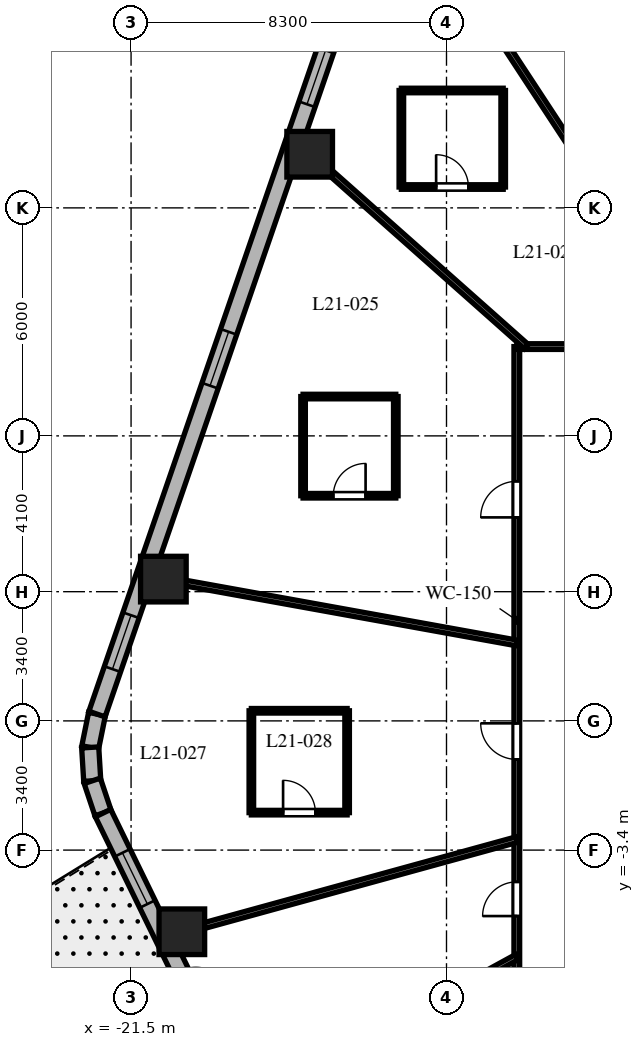
"""IFC4 building model, lengths in metres.
Left out: names, types, materials, properties, quantities, classifications, styles, units other than length and angle.
Written with IfcOpenShell. Run it as: python <this file> out.ifc"""

import sys

from ifc_helpers import new_model, si_unit, direction, frame, frame_2d, origin, origin_2d, place, context, subcontext, project, spatial, rectangle, extrude, element, fill, save


model = new_model("IFC4")
c1 = context("Model", 3, precision=1e-05, world=origin(), true_north=direction((0.0, 1.0)))
c2 = subcontext(c1, "Body", "Model", "MODEL_VIEW")
j1 = project(units=[si_unit("LENGTHUNIT", "METRE"), si_unit("PLANEANGLEUNIT", "RADIAN")], contexts=[c1])
p1 = place(None, origin())
s1 = spatial("IfcSite", under=j1, at=p1, CompositionType="ELEMENT")
p2 = place(p1, origin())
s2 = spatial("IfcBuilding", under=s1, at=p2, CompositionType="ELEMENT")
p3 = place(p2, frame((0.0, 0.0, 91.4)))
s3 = spatial("IfcBuildingStorey", under=s2, at=p3, CompositionType="ELEMENT", Elevation=91.4)
for number, where, z_axis, x_axis in (
    (1, (-16.8, 14.911, 0.0), (0.0, 0.0, 1.0), (1.0, 0.0, 0.0)),
    (2, (-20.65, 3.731, 0.0), (0.0, 0.0, 1.0), (1.0, 0.0, 0.0)),
    (3, (-20.164, -5.549, 0.0), (0.0, 0.0, 1.0), (1.0, 0.0, 0.0)),
):
    element("IfcColumn", number, at=place(p3, frame(where, z_axis=z_axis, x_axis=x_axis)), inside=s3, PredefinedType="COLUMN", context=c2, shape_type="SweptSolid", body=[
        extrude(rectangle(XDim=1.2, YDim=1.2, at=origin_2d()), origin(), (0.0, 0.0, 1.0), 3.7),
    ])
p4 = place(p3, frame((-22.397, 0.179, 0.0), z_axis=(0.0, 0.0, 1.0), x_axis=(-0.199313589404, -0.979935759669, 0.0)))
e4 = element("IfcWall", 4, at=p4, inside=s3, PredefinedType="SOLIDWALL", context=c2, shape_type="SweptSolid", body=[
    extrude(rectangle(XDim=0.896, YDim=0.45, at=frame_2d((0.448, 0.0))), origin(), (0.0, 0.0, 1.0), 3.4),
])
p5 = place(p3, frame((-22.575, -0.698, 0.0), z_axis=(0.0, 0.0, 1.0), x_axis=(0.060980441946, -0.998138961117, 0.0)))
e5 = element("IfcWall", 5, at=p5, inside=s3, PredefinedType="SOLIDWALL", context=c2, shape_type="SweptSolid", body=[
    extrude(rectangle(XDim=0.881, YDim=0.45, at=frame_2d((0.44, 0.0))), origin(), (0.0, 0.0, 1.0), 3.4),
])
p6 = place(p3, frame((-22.522, -1.577, 0.0), z_axis=(0.0, 0.0, 1.0), x_axis=(0.317372694837, -0.948300887151, 0.0)))
e6 = element("IfcWall", 6, at=p6, inside=s3, PredefinedType="SOLIDWALL", context=c2, shape_type="SweptSolid", body=[
    extrude(rectangle(XDim=0.896, YDim=0.45, at=frame_2d((0.448, 0.0))), origin(), (0.0, 0.0, 1.0), 3.4),
])
p7 = place(p3, frame((-15.992, 18.777, 0.0), z_axis=(0.0, 0.0, 1.0), x_axis=(-0.325606988926, -0.945505202927, 0.0)))
e7 = element("IfcWall", 7, at=p7, inside=s3, PredefinedType="SOLIDWALL", context=c2, shape_type="SweptSolid", body=[
    extrude(rectangle(XDim=19.669, YDim=0.45, at=frame_2d((9.835, 0.0))), origin(), (0.0, 0.0, 1.0), 3.4),
])
p8 = place(p7, frame((1.197, 0.0, 0.8)))
e8 = element("IfcOpeningElement", 8, at=p8, cuts=e7, PredefinedType="OPENING", context=c2, shape_type="SweptSolid", body=[
    extrude(rectangle(XDim=1.5, YDim=1.8, at=frame_2d((0.75, 0.9))), frame((0.0, 0.235, 0.0), z_axis=(0.0, -1.0, 0.0), x_axis=(1.0, 0.0, 0.0)), (0.0, 0.0, 1.0), 0.47),
])
p9 = place(p7, frame((9.03, 0.0, 0.8)))
e9 = element("IfcOpeningElement", 9, at=p9, cuts=e7, PredefinedType="OPENING", context=c2, shape_type="SweptSolid", body=[
    extrude(rectangle(XDim=1.5, YDim=1.8, at=frame_2d((0.75, 0.9))), frame((0.0, 0.235, 0.0), z_axis=(0.0, -1.0, 0.0), x_axis=(1.0, 0.0, 0.0)), (0.0, 0.0, 1.0), 0.47),
])
p10 = place(p7, frame((16.918, 0.0, 0.8)))
e10 = element("IfcOpeningElement", 10, at=p10, cuts=e7, PredefinedType="OPENING", context=c2, shape_type="SweptSolid", body=[
    extrude(rectangle(XDim=1.5, YDim=1.8, at=frame_2d((0.75, 0.9))), frame((0.0, 0.235, 0.0), z_axis=(0.0, -1.0, 0.0), x_axis=(1.0, 0.0, 0.0)), (0.0, 0.0, 1.0), 0.47),
])
p11 = place(p3, frame((-22.238, -2.427, 0.0), z_axis=(0.0, 0.0, 1.0), x_axis=(0.438374803278, -0.898792262901, 0.0)))
e11 = element("IfcWall", 11, at=p11, inside=s3, PredefinedType="SOLIDWALL", context=c2, shape_type="SweptSolid", body=[
    extrude(rectangle(XDim=18.618, YDim=0.45, at=frame_2d((9.309, 0.0))), origin(), (0.0, 0.0, 1.0), 3.4),
])
p12 = place(p11, frame((4.62, 0.0, 0.0)))
e12 = element("IfcOpeningElement", 12, at=p12, cuts=e11, PredefinedType="OPENING", context=c2, shape_type="SweptSolid", body=[
    extrude(rectangle(XDim=0.95, YDim=2.15, at=frame_2d((0.475, 1.075))), frame((0.0, 0.235, 0.0), z_axis=(0.0, -1.0, 0.0), x_axis=(1.0, 0.0, 0.0)), (0.0, 0.0, 1.0), 0.47),
])
p13 = place(p11, frame((1.163, 0.0, 0.8)))
e13 = element("IfcOpeningElement", 13, at=p13, cuts=e11, PredefinedType="OPENING", context=c2, shape_type="SweptSolid", body=[
    extrude(rectangle(XDim=1.5, YDim=1.8, at=frame_2d((0.75, 0.9))), frame((0.0, 0.235, 0.0), z_axis=(0.0, -1.0, 0.0), x_axis=(1.0, 0.0, 0.0)), (0.0, 0.0, 1.0), 0.47),
])
p14 = place(p11, frame((6.291, 0.0, 0.8)))
e14 = element("IfcOpeningElement", 14, at=p14, cuts=e11, PredefinedType="OPENING", context=c2, shape_type="SweptSolid", body=[
    extrude(rectangle(XDim=1.5, YDim=1.8, at=frame_2d((0.75, 0.9))), frame((0.0, 0.235, 0.0), z_axis=(0.0, -1.0, 0.0), x_axis=(1.0, 0.0, 0.0)), (0.0, 0.0, 1.0), 0.47),
])
p15 = place(p11, frame((10.831, 0.0, 0.8)))
e15 = element("IfcOpeningElement", 15, at=p15, cuts=e11, PredefinedType="OPENING", context=c2, shape_type="SweptSolid", body=[
    extrude(rectangle(XDim=1.5, YDim=1.8, at=frame_2d((0.75, 0.9))), frame((0.0, 0.235, 0.0), z_axis=(0.0, -1.0, 0.0), x_axis=(1.0, 0.0, 0.0)), (0.0, 0.0, 1.0), 0.47),
])
p16 = place(p11, frame((16.006, 0.0, 0.8)))
e16 = element("IfcOpeningElement", 16, at=p16, cuts=e11, PredefinedType="OPENING", context=c2, shape_type="SweptSolid", body=[
    extrude(rectangle(XDim=1.5, YDim=1.8, at=frame_2d((0.75, 0.9))), frame((0.0, 0.235, 0.0), z_axis=(0.0, -1.0, 0.0), x_axis=(1.0, 0.0, 0.0)), (0.0, 0.0, 1.0), 0.47),
])
p17 = place(p3, frame((-11.35, -9.85, 0.0), z_axis=(0.0, 0.0, 1.0), x_axis=(0.0, 1.0, 0.0)))
e17 = element("IfcWall", 17, at=p17, inside=s3, PredefinedType="PARTITIONING", context=c2, shape_type="SweptSolid", body=[
    extrude(rectangle(XDim=19.7, YDim=0.15, at=frame_2d((9.85, 0.0))), origin(), (0.0, 0.0, 1.0), 2.84),
])
p18 = place(p17, frame((15.205, 0.0, 0.0)))
e18 = element("IfcOpeningElement", 18, at=p18, cuts=e17, PredefinedType="OPENING", context=c2, shape_type="SweptSolid", body=[
    extrude(rectangle(XDim=0.95, YDim=2.03, at=frame_2d((0.475, 1.015))), frame((0.0, 0.085, 0.0), z_axis=(0.0, -1.0, 0.0), x_axis=(1.0, 0.0, 0.0)), (0.0, 0.0, 1.0), 0.17),
])
p19 = place(p17, frame((8.836, 0.0, 0.0)))
e19 = element("IfcOpeningElement", 19, at=p19, cuts=e17, PredefinedType="OPENING", context=c2, shape_type="SweptSolid", body=[
    extrude(rectangle(XDim=0.95, YDim=2.03, at=frame_2d((0.475, 1.015))), frame((0.0, 0.085, 0.0), z_axis=(0.0, -1.0, 0.0), x_axis=(1.0, 0.0, 0.0)), (0.0, 0.0, 1.0), 0.17),
])
p20 = place(p17, frame((4.714, 0.0, 0.0)))
e20 = element("IfcOpeningElement", 20, at=p20, cuts=e17, PredefinedType="OPENING", context=c2, shape_type="SweptSolid", body=[
    extrude(rectangle(XDim=0.9, YDim=2.03, at=frame_2d((0.45, 1.015))), frame((0.0, 0.085, 0.0), z_axis=(0.0, -1.0, 0.0), x_axis=(1.0, 0.0, 0.0)), (0.0, 0.0, 1.0), 0.17),
])
p21 = place(p17, frame((1.462, 0.0, 0.0)))
e21 = element("IfcOpeningElement", 21, at=p21, cuts=e17, PredefinedType="OPENING", context=c2, shape_type="SweptSolid", body=[
    extrude(rectangle(XDim=0.95, YDim=2.03, at=frame_2d((0.475, 1.015))), frame((0.0, 0.085, 0.0), z_axis=(0.0, -1.0, 0.0), x_axis=(1.0, 0.0, 0.0)), (0.0, 0.0, 1.0), 0.17),
])
p22 = place(p3, frame((-11.35, 9.85, 0.0), z_axis=(0.0, 0.0, 1.0), x_axis=(1.0, 0.0, 0.0)))
e22 = element("IfcWall", 22, at=p22, inside=s3, PredefinedType="PARTITIONING", context=c2, shape_type="SweptSolid", body=[
    extrude(rectangle(XDim=22.7, YDim=0.15, at=frame_2d((11.35, 0.0))), origin(), (0.0, 0.0, 1.0), 2.84),
])
p23 = place(p22, frame((18.679, 0.0, 0.0)))
e23 = element("IfcOpeningElement", 23, at=p23, cuts=e22, PredefinedType="OPENING", context=c2, shape_type="SweptSolid", body=[
    extrude(rectangle(XDim=0.9, YDim=2.03, at=frame_2d((0.45, 1.015))), frame((0.0, 0.085, 0.0), z_axis=(0.0, -1.0, 0.0), x_axis=(1.0, 0.0, 0.0)), (0.0, 0.0, 1.0), 0.17),
])
p24 = place(p22, frame((15.337, 0.0, 0.0)))
e24 = element("IfcOpeningElement", 24, at=p24, cuts=e22, PredefinedType="OPENING", context=c2, shape_type="SweptSolid", body=[
    extrude(rectangle(XDim=0.9, YDim=2.03, at=frame_2d((0.45, 1.015))), frame((0.0, 0.085, 0.0), z_axis=(0.0, -1.0, 0.0), x_axis=(1.0, 0.0, 0.0)), (0.0, 0.0, 1.0), 0.17),
])
p25 = place(p22, frame((11.994, 0.0, 0.0)))
e25 = element("IfcOpeningElement", 25, at=p25, cuts=e22, PredefinedType="OPENING", context=c2, shape_type="SweptSolid", body=[
    extrude(rectangle(XDim=0.95, YDim=2.03, at=frame_2d((0.475, 1.015))), frame((0.0, 0.085, 0.0), z_axis=(0.0, -1.0, 0.0), x_axis=(1.0, 0.0, 0.0)), (0.0, 0.0, 1.0), 0.17),
])
p26 = place(p22, frame((8.559, 0.0, 0.0)))
e26 = element("IfcOpeningElement", 26, at=p26, cuts=e22, PredefinedType="OPENING", context=c2, shape_type="SweptSolid", body=[
    extrude(rectangle(XDim=0.95, YDim=2.03, at=frame_2d((0.475, 1.015))), frame((0.0, 0.085, 0.0), z_axis=(0.0, -1.0, 0.0), x_axis=(1.0, 0.0, 0.0)), (0.0, 0.0, 1.0), 0.17),
])
p27 = place(p22, frame((5.728, 0.0, 0.0)))
e27 = element("IfcOpeningElement", 27, at=p27, cuts=e22, PredefinedType="OPENING", context=c2, shape_type="SweptSolid", body=[
    extrude(rectangle(XDim=0.9, YDim=2.03, at=frame_2d((0.45, 1.015))), frame((0.0, 0.085, 0.0), z_axis=(0.0, -1.0, 0.0), x_axis=(1.0, 0.0, 0.0)), (0.0, 0.0, 1.0), 0.17),
])
p28 = place(p22, frame((2.093, 0.0, 0.0)))
e28 = element("IfcOpeningElement", 28, at=p28, cuts=e22, PredefinedType="OPENING", context=c2, shape_type="SweptSolid", body=[
    extrude(rectangle(XDim=0.95, YDim=2.03, at=frame_2d((0.475, 1.015))), frame((0.0, 0.085, 0.0), z_axis=(0.0, -1.0, 0.0), x_axis=(1.0, 0.0, 0.0)), (0.0, 0.0, 1.0), 0.17),
])
p29 = place(p3, frame((-6.454, 9.85, 0.0), z_axis=(0.0, 0.0, 1.0), x_axis=(-0.548052950111, 0.836443640584, 0.0)))
e29 = element("IfcWall", 29, at=p29, inside=s3, PredefinedType="PARTITIONING", context=c2, shape_type="SweptSolid", body=[
    extrude(rectangle(XDim=13.019, YDim=0.15, at=frame_2d((6.51, 0.0))), origin(), (0.0, 0.0, 1.0), 2.54),
])
p30 = place(p3, frame((-11.098, 9.85, 0.0), z_axis=(0.0, 0.0, 1.0), x_axis=(-0.747904295103, 0.663806572253, 0.0)))
e30 = element("IfcWall", 30, at=p30, inside=s3, PredefinedType="PARTITIONING", context=c2, shape_type="SweptSolid", body=[
    extrude(rectangle(XDim=8.16, YDim=0.15, at=frame_2d((4.08, 0.0))), origin(), (0.0, 0.0, 1.0), 2.54),
])
p31 = place(p3, frame((-11.35, 2.051, 0.0), z_axis=(0.0, 0.0, 1.0), x_axis=(-0.984068313063, 0.177790762484, 0.0)))
e31 = element("IfcWall", 31, at=p31, inside=s3, PredefinedType="PARTITIONING", context=c2, shape_type="SweptSolid", body=[
    extrude(rectangle(XDim=9.951, YDim=0.15, at=frame_2d((4.976, 0.0))), origin(), (0.0, 0.0, 1.0), 2.54),
])
p32 = place(p3, frame((-11.35, -3.123, 0.0), z_axis=(0.0, 0.0, 1.0), x_axis=(-0.964151983214, -0.265350623261, 0.0)))
e32 = element("IfcWall", 32, at=p32, inside=s3, PredefinedType="PARTITIONING", context=c2, shape_type="SweptSolid", body=[
    extrude(rectangle(XDim=9.645, YDim=0.15, at=frame_2d((4.823, 0.0))), origin(), (0.0, 0.0, 1.0), 2.54),
])
p33 = place(p3, frame((-11.35, -6.215, 0.0), z_axis=(0.0, 0.0, 1.0), x_axis=(-0.877115535756, -0.480279436303, 0.0)))
e33 = element("IfcWall", 33, at=p33, inside=s3, PredefinedType="PARTITIONING", context=c2, shape_type="SweptSolid", body=[
    extrude(rectangle(XDim=8.134, YDim=0.15, at=frame_2d((4.067, 0.0))), origin(), (0.0, 0.0, 1.0), 2.54),
])
p34 = place(p3, frame((-14.388, 14.049, 0.0), z_axis=(0.0, 0.0, 1.0), x_axis=(1.0, 0.0, 0.0)))
e34 = element("IfcWall", 34, at=p34, inside=s3, PredefinedType="PARTITIONING", context=c2, shape_type="SweptSolid", body=[
    extrude(rectangle(XDim=2.68, YDim=0.12, at=frame_2d((1.34, 0.0))), origin(), (0.0, 0.0, 1.0), 2.927),
])
p35 = place(p34, frame((0.915, 0.0, 0.0)))
e35 = element("IfcOpeningElement", 35, at=p35, cuts=e34, PredefinedType="OPENING", context=c2, shape_type="SweptSolid", body=[
    extrude(rectangle(XDim=0.85, YDim=2.03, at=frame_2d((0.425, 1.015))), frame((0.0, 0.07, 0.0), z_axis=(0.0, -1.0, 0.0), x_axis=(1.0, 0.0, 0.0)), (0.0, 0.0, 1.0), 0.14),
])
p36 = place(p3, frame((-11.708, 14.049, 0.0), z_axis=(0.0, 0.0, 1.0), x_axis=(0.0, 1.0, 0.0)))
e36 = element("IfcWall", 36, at=p36, inside=s3, PredefinedType="PARTITIONING", context=c2, shape_type="SweptSolid", body=[
    extrude(rectangle(XDim=2.54, YDim=0.12, at=frame_2d((1.27, 0.0))), origin(), (0.0, 0.0, 1.0), 2.927),
])
p37 = place(p3, frame((-11.708, 16.589, 0.0), z_axis=(0.0, 0.0, 1.0), x_axis=(-1.0, 0.0, 0.0)))
e37 = element("IfcWall", 37, at=p37, inside=s3, PredefinedType="PARTITIONING", context=c2, shape_type="SweptSolid", body=[
    extrude(rectangle(XDim=2.68, YDim=0.12, at=frame_2d((1.34, 0.0))), origin(), (0.0, 0.0, 1.0), 2.54),
])
p38 = place(p3, frame((-14.388, 16.589, 0.0), z_axis=(0.0, 0.0, 1.0), x_axis=(0.0, -1.0, 0.0)))
e38 = element("IfcWall", 38, at=p38, inside=s3, PredefinedType="PARTITIONING", context=c2, shape_type="SweptSolid", body=[
    extrude(rectangle(XDim=2.54, YDim=0.12, at=frame_2d((1.27, 0.0))), origin(), (0.0, 0.0, 1.0), 2.54),
])
p39 = place(p3, frame((-16.974, 5.925, 0.0), z_axis=(0.0, 0.0, 1.0), x_axis=(1.0, 0.0, 0.0)))
e39 = element("IfcWall", 39, at=p39, inside=s3, PredefinedType="PARTITIONING", context=c2, shape_type="SweptSolid", body=[
    extrude(rectangle(XDim=2.44, YDim=0.12, at=frame_2d((1.22, 0.0))), origin(), (0.0, 0.0, 1.0), 2.972),
])
p40 = place(p39, frame((0.795, 0.0, 0.0)))
e40 = element("IfcOpeningElement", 40, at=p40, cuts=e39, PredefinedType="OPENING", context=c2, shape_type="SweptSolid", body=[
    extrude(rectangle(XDim=0.85, YDim=2.03, at=frame_2d((0.425, 1.015))), frame((0.0, 0.07, 0.0), z_axis=(0.0, -1.0, 0.0), x_axis=(1.0, 0.0, 0.0)), (0.0, 0.0, 1.0), 0.14),
])
p41 = place(p3, frame((-14.534, 5.925, 0.0), z_axis=(0.0, 0.0, 1.0), x_axis=(0.0, 1.0, 0.0)))
e41 = element("IfcWall", 41, at=p41, inside=s3, PredefinedType="PARTITIONING", context=c2, shape_type="SweptSolid", body=[
    extrude(rectangle(XDim=2.61, YDim=0.12, at=frame_2d((1.305, 0.0))), origin(), (0.0, 0.0, 1.0), 3.4),
])
p42 = place(p3, frame((-14.534, 8.535, 0.0), z_axis=(0.0, 0.0, 1.0), x_axis=(-1.0, 0.0, 0.0)))
e42 = element("IfcWall", 42, at=p42, inside=s3, PredefinedType="PARTITIONING", context=c2, shape_type="SweptSolid", body=[
    extrude(rectangle(XDim=2.44, YDim=0.12, at=frame_2d((1.22, 0.0))), origin(), (0.0, 0.0, 1.0), 2.972),
])
p43 = place(p3, frame((-16.974, 8.535, 0.0), z_axis=(0.0, 0.0, 1.0), x_axis=(0.0, -1.0, 0.0)))
e43 = element("IfcWall", 43, at=p43, inside=s3, PredefinedType="PARTITIONING", context=c2, shape_type="SweptSolid", body=[
    extrude(rectangle(XDim=2.61, YDim=0.12, at=frame_2d((1.305, 0.0))), origin(), (0.0, 0.0, 1.0), 3.4),
])
p44 = place(p3, frame((-18.335, -2.414, 0.0), z_axis=(0.0, 0.0, 1.0), x_axis=(1.0, 0.0, 0.0)))
e44 = element("IfcWall", 44, at=p44, inside=s3, PredefinedType="PARTITIONING", context=c2, shape_type="SweptSolid", body=[
    extrude(rectangle(XDim=2.52, YDim=0.12, at=frame_2d((1.26, 0.0))), origin(), (0.0, 0.0, 1.0), 2.841),
])
p45 = place(p44, frame((0.835, 0.0, 0.0)))
e45 = element("IfcOpeningElement", 45, at=p45, cuts=e44, PredefinedType="OPENING", context=c2, shape_type="SweptSolid", body=[
    extrude(rectangle(XDim=0.85, YDim=2.03, at=frame_2d((0.425, 1.015))), frame((0.0, 0.07, 0.0), z_axis=(0.0, -1.0, 0.0), x_axis=(1.0, 0.0, 0.0)), (0.0, 0.0, 1.0), 0.14),
])
p46 = place(p3, frame((-15.815, -2.414, 0.0), z_axis=(0.0, 0.0, 1.0), x_axis=(0.0, 1.0, 0.0)))
e46 = element("IfcWall", 46, at=p46, inside=s3, PredefinedType="PARTITIONING", context=c2, shape_type="SweptSolid", body=[
    extrude(rectangle(XDim=2.68, YDim=0.12, at=frame_2d((1.34, 0.0))), origin(), (0.0, 0.0, 1.0), 3.4),
])
p47 = place(p3, frame((-15.815, 0.266, 0.0), z_axis=(0.0, 0.0, 1.0), x_axis=(-1.0, 0.0, 0.0)))
e47 = element("IfcWall", 47, at=p47, inside=s3, PredefinedType="PARTITIONING", context=c2, shape_type="SweptSolid", body=[
    extrude(rectangle(XDim=2.52, YDim=0.12, at=frame_2d((1.26, 0.0))), origin(), (0.0, 0.0, 1.0), 2.841),
])
p48 = place(p3, frame((-18.335, 0.266, 0.0), z_axis=(0.0, 0.0, 1.0), x_axis=(0.0, -1.0, 0.0)))
e48 = element("IfcWall", 48, at=p48, inside=s3, PredefinedType="PARTITIONING", context=c2, shape_type="SweptSolid", body=[
    extrude(rectangle(XDim=2.68, YDim=0.12, at=frame_2d((1.34, 0.0))), origin(), (0.0, 0.0, 1.0), 3.4),
])
p49 = place(p8, origin())
e49 = element("IfcWindow", 49, at=p49, inside=s3, PartitioningType="SINGLE_PANEL", PredefinedType="WINDOW", context=c2, shape_type="SweptSolid", body=[
    extrude(rectangle(XDim=1.5, YDim=1.8, at=frame_2d((0.75, 0.9))), frame((0.0, 0.03, 0.0), z_axis=(0.0, -1.0, 0.0), x_axis=(1.0, 0.0, 0.0)), (0.0, 0.0, 1.0), 0.06),
])
fill(e8, e49)
p50 = place(p9, origin())
e50 = element("IfcWindow", 50, at=p50, inside=s3, PartitioningType="SINGLE_PANEL", PredefinedType="WINDOW", context=c2, shape_type="SweptSolid", body=[
    extrude(rectangle(XDim=1.5, YDim=1.8, at=frame_2d((0.75, 0.9))), frame((0.0, 0.03, 0.0), z_axis=(0.0, -1.0, 0.0), x_axis=(1.0, 0.0, 0.0)), (0.0, 0.0, 1.0), 0.06),
])
fill(e9, e50)
p51 = place(p10, origin())
e51 = element("IfcWindow", 51, at=p51, inside=s3, PartitioningType="SINGLE_PANEL", PredefinedType="WINDOW", context=c2, shape_type="SweptSolid", body=[
    extrude(rectangle(XDim=1.5, YDim=1.8, at=frame_2d((0.75, 0.9))), frame((0.0, 0.03, 0.0), z_axis=(0.0, -1.0, 0.0), x_axis=(1.0, 0.0, 0.0)), (0.0, 0.0, 1.0), 0.06),
])
fill(e10, e51)
p52 = place(p13, origin())
e52 = element("IfcWindow", 52, at=p52, inside=s3, PartitioningType="SINGLE_PANEL", PredefinedType="WINDOW", context=c2, shape_type="SweptSolid", body=[
    extrude(rectangle(XDim=1.5, YDim=1.8, at=frame_2d((0.75, 0.9))), frame((0.0, 0.03, 0.0), z_axis=(0.0, -1.0, 0.0), x_axis=(1.0, 0.0, 0.0)), (0.0, 0.0, 1.0), 0.06),
])
fill(e13, e52)
p53 = place(p35, origin())
e53 = element("IfcDoor", 53, at=p53, inside=s3, OperationType="SINGLE_SWING_LEFT", PredefinedType="DOOR", context=c2, shape_type="SweptSolid", body=[
    extrude(rectangle(XDim=0.85, YDim=2.03, at=frame_2d((0.425, 1.015))), frame((0.0, 0.025, 0.0), z_axis=(0.0, -1.0, 0.0), x_axis=(1.0, 0.0, 0.0)), (0.0, 0.0, 1.0), 0.05),
])
fill(e35, e53)
p54 = place(p18, origin())
e54 = element("IfcDoor", 54, at=p54, inside=s3, OperationType="SINGLE_SWING_LEFT", PredefinedType="DOOR", context=c2, shape_type="SweptSolid", body=[
    extrude(rectangle(XDim=0.95, YDim=2.03, at=frame_2d((0.475, 1.015))), frame((0.0, 0.025, 0.0), z_axis=(0.0, -1.0, 0.0), x_axis=(1.0, 0.0, 0.0)), (0.0, 0.0, 1.0), 0.05),
])
fill(e18, e54)
p55 = place(p40, origin())
e55 = element("IfcDoor", 55, at=p55, inside=s3, OperationType="SINGLE_SWING_RIGHT", PredefinedType="DOOR", context=c2, shape_type="SweptSolid", body=[
    extrude(rectangle(XDim=0.85, YDim=2.03, at=frame_2d((0.425, 1.015))), frame((0.0, 0.025, 0.0), z_axis=(0.0, -1.0, 0.0), x_axis=(1.0, 0.0, 0.0)), (0.0, 0.0, 1.0), 0.05),
])
fill(e40, e55)
p56 = place(p19, origin())
e56 = element("IfcDoor", 56, at=p56, inside=s3, OperationType="SINGLE_SWING_RIGHT", PredefinedType="DOOR", context=c2, shape_type="SweptSolid", body=[
    extrude(rectangle(XDim=0.95, YDim=2.03, at=frame_2d((0.475, 1.015))), frame((0.0, 0.025, 0.0), z_axis=(0.0, -1.0, 0.0), x_axis=(1.0, 0.0, 0.0)), (0.0, 0.0, 1.0), 0.05),
])
fill(e19, e56)
p57 = place(p45, origin())
e57 = element("IfcDoor", 57, at=p57, inside=s3, OperationType="SINGLE_SWING_LEFT", PredefinedType="DOOR", context=c2, shape_type="SweptSolid", body=[
    extrude(rectangle(XDim=0.85, YDim=2.03, at=frame_2d((0.425, 1.015))), frame((0.0, 0.025, 0.0), z_axis=(0.0, -1.0, 0.0), x_axis=(1.0, 0.0, 0.0)), (0.0, 0.0, 1.0), 0.05),
])
fill(e45, e57)
p58 = place(p20, origin())
e58 = element("IfcDoor", 58, at=p58, inside=s3, OperationType="SINGLE_SWING_LEFT", PredefinedType="DOOR", context=c2, shape_type="SweptSolid", body=[
    extrude(rectangle(XDim=0.9, YDim=2.03, at=frame_2d((0.45, 1.015))), frame((0.0, 0.025, 0.0), z_axis=(0.0, -1.0, 0.0), x_axis=(1.0, 0.0, 0.0)), (0.0, 0.0, 1.0), 0.05),
])
fill(e20, e58)
save(model, sys.argv[1])
